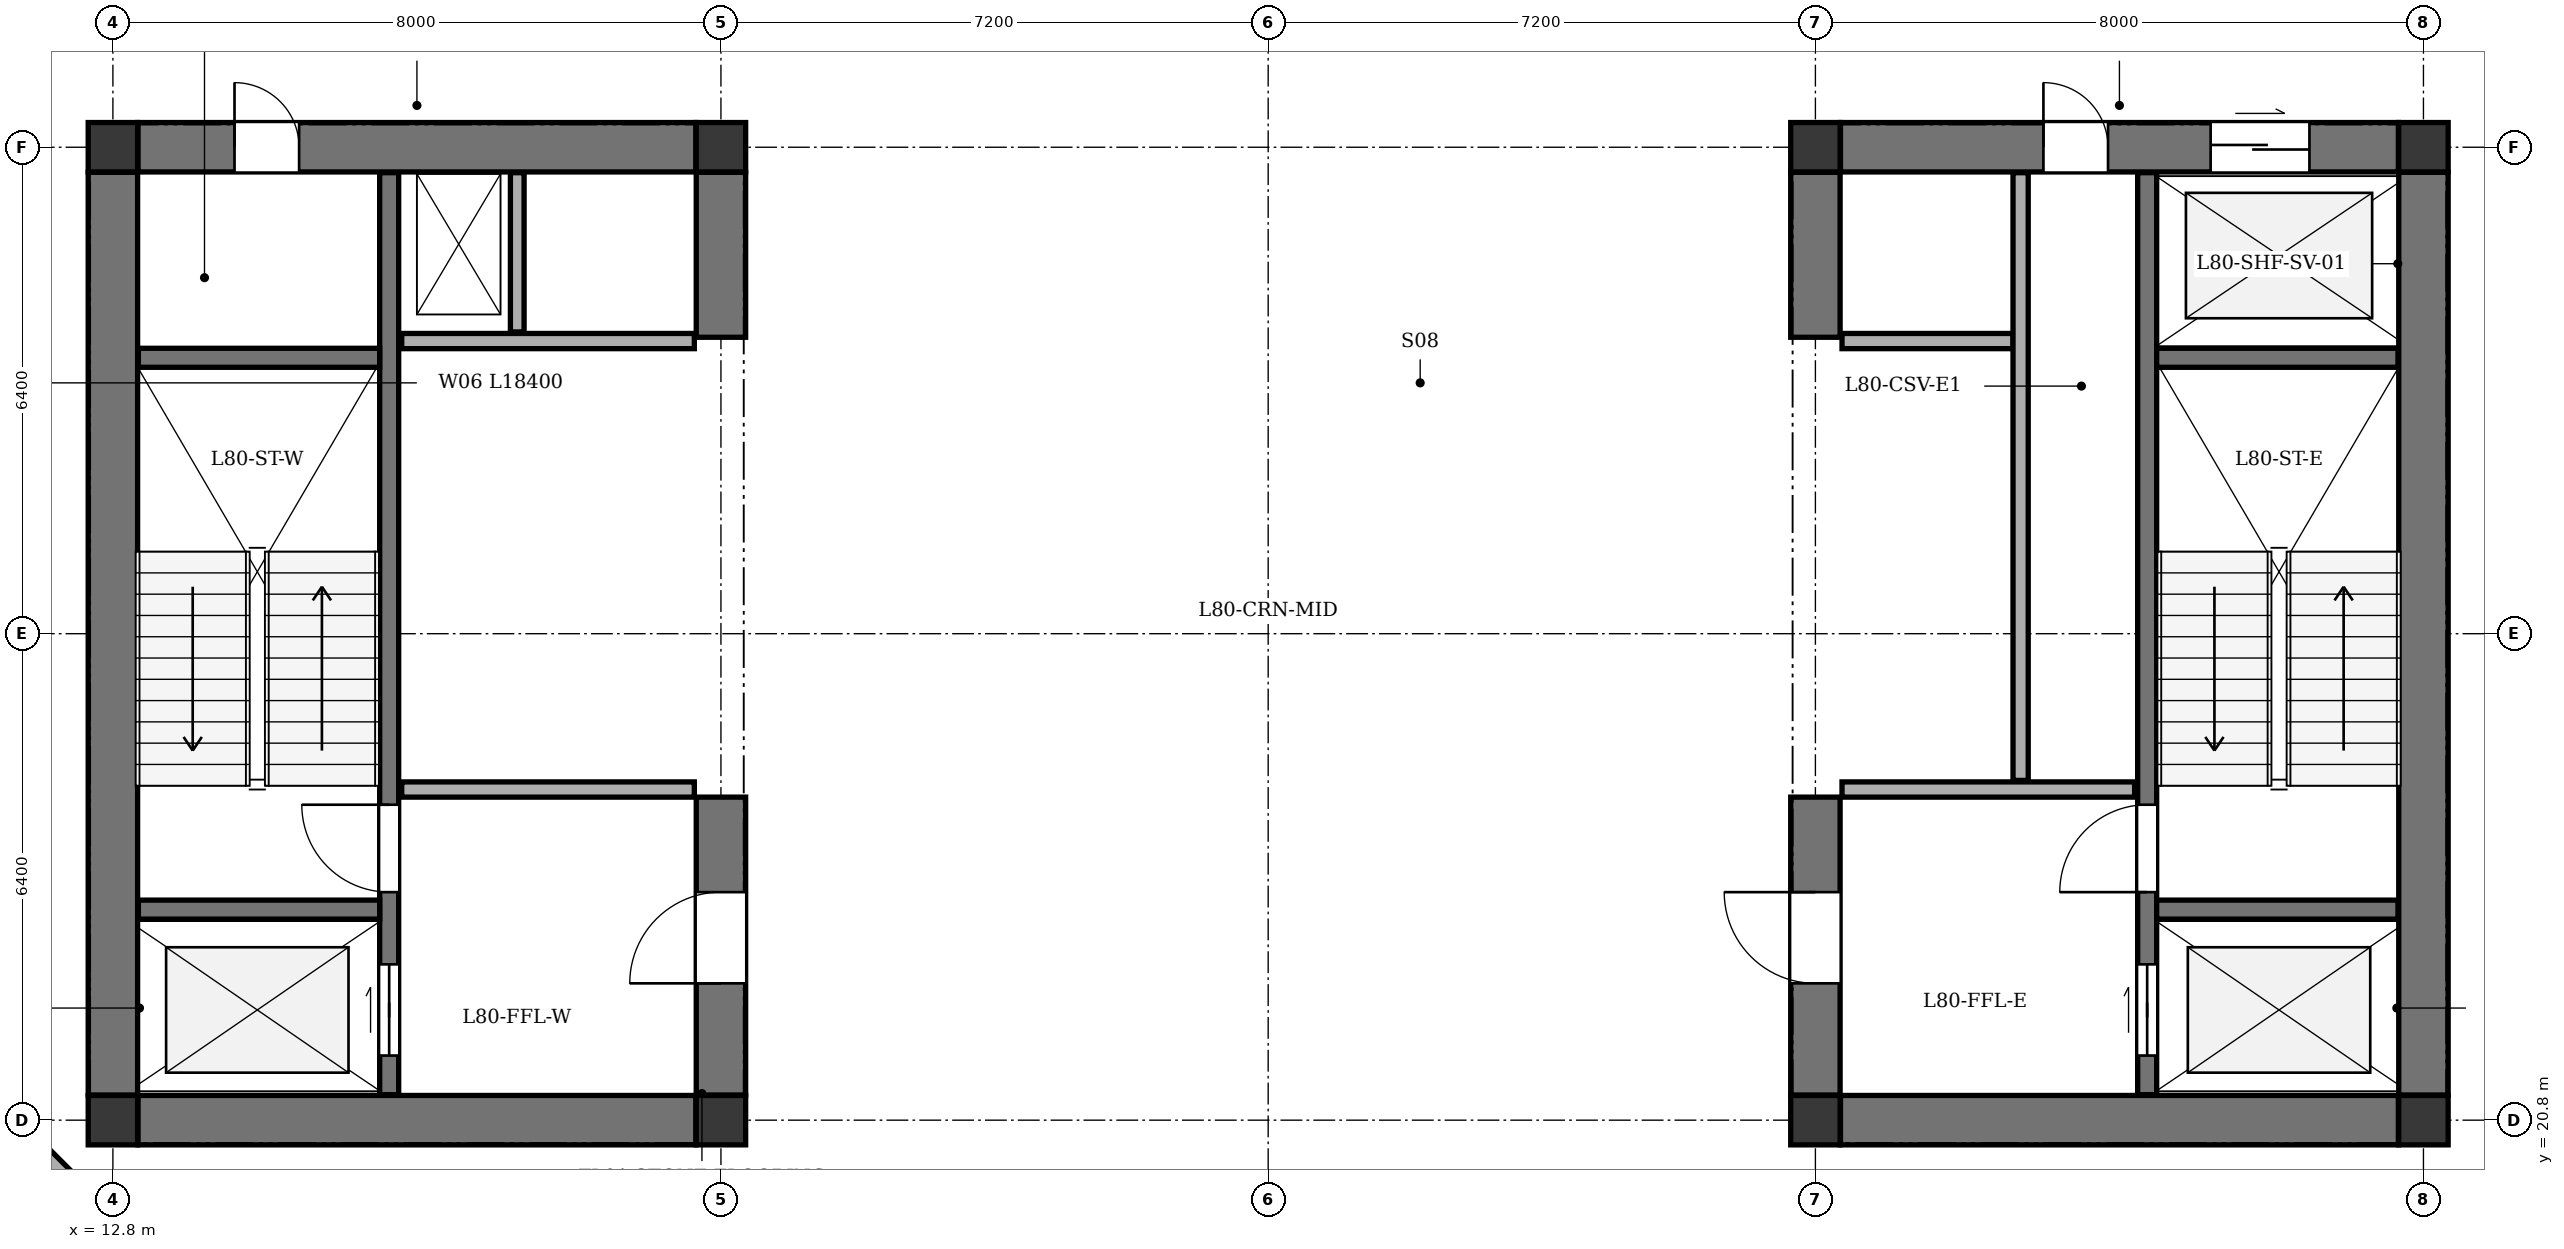
"""IFC4 building model, lengths in metres.
Left out: names, types, materials, properties, quantities, classifications, styles, units other than length and angle.
Written with IfcOpenShell. Run it as: python <this file> out.ifc"""

import sys

from ifc_helpers import new_model, si_unit, direction, frame, frame_2d, origin, origin_2d, place, context, subcontext, project, spatial, rectangle, extrude, element, fill, save


model = new_model("IFC4")
c1 = context("Model", 3, precision=1e-05, world=origin(), true_north=direction((0.0, 1.0)))
c2 = subcontext(c1, "Body", "Model", "MODEL_VIEW")
j1 = project(units=[si_unit("LENGTHUNIT", "METRE"), si_unit("PLANEANGLEUNIT", "RADIAN")], contexts=[c1])
p1 = place(None, origin())
s1 = spatial("IfcSite", under=j1, at=p1, CompositionType="ELEMENT")
p2 = place(p1, origin())
s2 = spatial("IfcBuilding", under=s1, at=p2, CompositionType="ELEMENT")
p3 = place(p2, frame((0.0, 0.0, 304.8)))
s3 = spatial("IfcBuildingStorey", under=s2, at=p3, CompositionType="ELEMENT", Elevation=304.8)
for number, where, z_axis, x_axis in (
    (1, (12.8, 20.8, 0.0), (0.0, 0.0, 1.0), (1.0, 0.0, 0.0)),
    (2, (20.8, 20.8, 0.0), (0.0, 0.0, 1.0), (1.0, 0.0, 0.0)),
    (3, (12.8, 33.6, 0.0), (0.0, 0.0, 1.0), (1.0, 0.0, 0.0)),
    (4, (20.8, 33.6, 0.0), (0.0, 0.0, 1.0), (1.0, 0.0, 0.0)),
    (5, (35.2, 20.8, 0.0), (0.0, 0.0, 1.0), (1.0, 0.0, 0.0)),
    (6, (43.2, 20.8, 0.0), (0.0, 0.0, 1.0), (1.0, 0.0, 0.0)),
    (7, (35.2, 33.6, 0.0), (0.0, 0.0, 1.0), (1.0, 0.0, 0.0)),
    (8, (43.2, 33.6, 0.0), (0.0, 0.0, 1.0), (1.0, 0.0, 0.0)),
):
    element("IfcColumn", number, at=place(p3, frame(where, z_axis=z_axis, x_axis=x_axis)), inside=s3, PredefinedType="COLUMN", context=c2, shape_type="SweptSolid", body=[
        extrude(rectangle(XDim=0.65, YDim=0.65, at=origin_2d()), origin(), (0.0, 0.0, 1.0), 4.2),
    ])
p4 = place(p3, frame((14.2, 17.97, 0.0), z_axis=(0.0, 0.0, 1.0), x_axis=(-0.707080859425, 0.707132701998, 0.0)))
e9 = element("IfcWall", 9, at=p4, inside=s3, PredefinedType="STANDARD", context=c2, shape_type="SweptSolid", body=[
    extrude(rectangle(XDim=4.709, YDim=0.3, at=frame_2d((2.354, 0.0))), origin(), (0.0, 0.0, 1.0), 3.545),
])
p5 = place(p3, frame((12.8, 21.13, 0.0), z_axis=(0.0, 0.0, 1.0), x_axis=(0.0, 1.0, 0.0)))
e10 = element("IfcWall", 10, at=p5, inside=s3, PredefinedType="SHEAR", context=c2, shape_type="SweptSolid", body=[
    extrude(rectangle(XDim=12.14, YDim=0.65, at=frame_2d((6.07, 0.0))), origin(), (0.0, 0.0, 1.0), 3.92),
])
p6 = place(p3, frame((13.13, 20.8, 0.0), z_axis=(0.0, 0.0, 1.0), x_axis=(1.0, 0.0, 0.0)))
e11 = element("IfcWall", 11, at=p6, inside=s3, PredefinedType="SHEAR", context=c2, shape_type="SweptSolid", body=[
    extrude(rectangle(XDim=7.34, YDim=0.65, at=frame_2d((3.67, 0.0))), origin(), (0.0, 0.0, 1.0), 3.92),
])
p7 = place(p3, frame((13.13, 33.6, 0.0), z_axis=(0.0, 0.0, 1.0), x_axis=(1.0, 0.0, 0.0)))
e12 = element("IfcWall", 12, at=p7, inside=s3, PredefinedType="SHEAR", context=c2, shape_type="SweptSolid", body=[
    extrude(rectangle(XDim=7.34, YDim=0.65, at=frame_2d((3.67, 0.0))), origin(), (0.0, 0.0, 1.0), 3.92),
])
p8 = place(p7, frame((1.27, 0.0, 0.0)))
e13 = element("IfcOpeningElement", 13, at=p8, cuts=e12, PredefinedType="OPENING", context=c2, shape_type="SweptSolid", body=[
    extrude(rectangle(XDim=0.85, YDim=2.02, at=frame_2d((0.425, 1.01))), frame((0.0, 0.335, 0.0), z_axis=(0.0, -1.0, 0.0), x_axis=(1.0, 0.0, 0.0)), (0.0, 0.0, 1.0), 0.67),
])
p9 = place(p3, frame((20.8, 21.13, 0.0), z_axis=(0.0, 0.0, 1.0), x_axis=(0.0, 1.0, 0.0)))
e14 = element("IfcWall", 14, at=p9, inside=s3, PredefinedType="SHEAR", context=c2, shape_type="SweptSolid", body=[
    extrude(rectangle(XDim=3.92, YDim=0.65, at=frame_2d((1.96, 0.0))), origin(), (0.0, 0.0, 1.0), 3.92),
])
p10 = place(p9, frame((1.47, 0.0, 0.0)))
e15 = element("IfcOpeningElement", 15, at=p10, cuts=e14, PredefinedType="OPENING", context=c2, shape_type="SweptSolid", body=[
    extrude(rectangle(XDim=1.2, YDim=2.15, at=frame_2d((0.6, 1.075))), frame((0.0, 0.335, 0.0), z_axis=(0.0, -1.0, 0.0), x_axis=(1.0, 0.0, 0.0)), (0.0, 0.0, 1.0), 0.67),
])
p11 = place(p3, frame((20.8, 31.1, 0.0), z_axis=(0.0, 0.0, 1.0), x_axis=(0.0, 1.0, 0.0)))
e16 = element("IfcWall", 16, at=p11, inside=s3, PredefinedType="SHEAR", context=c2, shape_type="SweptSolid", body=[
    extrude(rectangle(XDim=2.17, YDim=0.65, at=frame_2d((1.085, 0.0))), origin(), (0.0, 0.0, 1.0), 3.92),
])
p12 = place(p3, frame((16.435, 21.135, 0.0), z_axis=(0.0, 0.0, 1.0), x_axis=(0.0, 1.0, 0.0)))
e17 = element("IfcWall", 17, at=p12, inside=s3, PredefinedType="SHEAR", context=c2, shape_type="SweptSolid", body=[
    extrude(rectangle(XDim=12.13, YDim=0.25, at=frame_2d((6.065, 0.0))), origin(), (0.0, 0.0, 1.0), 3.92),
])
p13 = place(p12, frame((0.515, 0.0, 0.0)))
e18 = element("IfcOpeningElement", 18, at=p13, cuts=e17, PredefinedType="OPENING", context=c2, shape_type="SweptSolid", body=[
    extrude(rectangle(XDim=1.2, YDim=2.15, at=frame_2d((0.6, 1.075))), frame((0.0, 0.135, 0.0), z_axis=(0.0, -1.0, 0.0), x_axis=(1.0, 0.0, 0.0)), (0.0, 0.0, 1.0), 0.27),
])
p14 = place(p12, frame((2.665, 0.0, 0.0)))
e19 = element("IfcOpeningElement", 19, at=p14, cuts=e17, PredefinedType="OPENING", context=c2, shape_type="SweptSolid", body=[
    extrude(rectangle(XDim=1.15, YDim=2.15, at=frame_2d((0.575, 1.075))), frame((0.0, 0.135, 0.0), z_axis=(0.0, -1.0, 0.0), x_axis=(1.0, 0.0, 0.0)), (0.0, 0.0, 1.0), 0.27),
])
for number, where, z_axis, x_axis in (
    (20, (13.135, 23.57, 0.0), (0.0, 0.0, 1.0), (1.0, 0.0, 0.0)),
    (21, (13.135, 30.83, 0.0), (0.0, 0.0, 1.0), (1.0, 0.0, 0.0)),
):
    element("IfcWall", number, at=place(p3, frame(where, z_axis=z_axis, x_axis=x_axis)), inside=s3, PredefinedType="SHEAR", context=c2, shape_type="SweptSolid", body=[
        extrude(rectangle(XDim=3.175, YDim=0.25, at=frame_2d((1.587, 0.0))), origin(), (0.0, 0.0, 1.0), 3.92),
    ])
for number, where, z_axis, x_axis in (
    (22, (16.6, 25.15, 0.0), (0.0, 0.0, 1.0), (1.0, 0.0, 0.0)),
    (23, (16.6, 31.05, 0.0), (0.0, 0.0, 1.0), (1.0, 0.0, 0.0)),
):
    element("IfcWall", number, at=place(p3, frame(where, z_axis=z_axis, x_axis=x_axis)), inside=s3, PredefinedType="SOLIDWALL", context=c2, shape_type="SweptSolid", body=[
        extrude(rectangle(XDim=3.85, YDim=0.2, at=frame_2d((1.925, 0.0))), origin(), (0.0, 0.0, 1.0), 3.92),
    ])
p15 = place(p3, frame((18.12, 31.17, 0.0), z_axis=(0.0, 0.0, 1.0), x_axis=(0.0, 1.0, 0.0)))
e24 = element("IfcWall", 24, at=p15, inside=s3, PredefinedType="PARTITIONING", context=c2, shape_type="SweptSolid", body=[
    extrude(rectangle(XDim=2.095, YDim=0.18, at=frame_2d((1.047, 0.0))), origin(), (0.0, 0.0, 1.0), 3.92),
])
p16 = place(p3, frame((43.2, 21.13, 0.0), z_axis=(0.0, 0.0, 1.0), x_axis=(0.0, 1.0, 0.0)))
e25 = element("IfcWall", 25, at=p16, inside=s3, PredefinedType="SHEAR", context=c2, shape_type="SweptSolid", body=[
    extrude(rectangle(XDim=12.14, YDim=0.65, at=frame_2d((6.07, 0.0))), origin(), (0.0, 0.0, 1.0), 3.92),
])
p17 = place(p3, frame((35.53, 20.8, 0.0), z_axis=(0.0, 0.0, 1.0), x_axis=(1.0, 0.0, 0.0)))
e26 = element("IfcWall", 26, at=p17, inside=s3, PredefinedType="SHEAR", context=c2, shape_type="SweptSolid", body=[
    extrude(rectangle(XDim=7.34, YDim=0.65, at=frame_2d((3.67, 0.0))), origin(), (0.0, 0.0, 1.0), 3.92),
])
p18 = place(p3, frame((35.53, 33.6, 0.0), z_axis=(0.0, 0.0, 1.0), x_axis=(1.0, 0.0, 0.0)))
e27 = element("IfcWall", 27, at=p18, inside=s3, PredefinedType="SHEAR", context=c2, shape_type="SweptSolid", body=[
    extrude(rectangle(XDim=7.34, YDim=0.65, at=frame_2d((3.67, 0.0))), origin(), (0.0, 0.0, 1.0), 3.92),
])
p19 = place(p18, frame((4.87, 0.0, 0.0)))
e28 = element("IfcOpeningElement", 28, at=p19, cuts=e27, PredefinedType="OPENING", context=c2, shape_type="SweptSolid", body=[
    extrude(rectangle(XDim=1.3, YDim=2.15, at=frame_2d((0.65, 1.075))), frame((0.0, 0.335, 0.0), z_axis=(0.0, -1.0, 0.0), x_axis=(1.0, 0.0, 0.0)), (0.0, 0.0, 1.0), 0.67),
])
p20 = place(p18, frame((2.67, 0.0, 0.0)))
e29 = element("IfcOpeningElement", 29, at=p20, cuts=e27, PredefinedType="OPENING", context=c2, shape_type="SweptSolid", body=[
    extrude(rectangle(XDim=0.85, YDim=2.02, at=frame_2d((0.425, 1.01))), frame((0.0, 0.335, 0.0), z_axis=(0.0, -1.0, 0.0), x_axis=(1.0, 0.0, 0.0)), (0.0, 0.0, 1.0), 0.67),
])
p21 = place(p3, frame((35.2, 21.13, 0.0), z_axis=(0.0, 0.0, 1.0), x_axis=(0.0, 1.0, 0.0)))
e30 = element("IfcWall", 30, at=p21, inside=s3, PredefinedType="SHEAR", context=c2, shape_type="SweptSolid", body=[
    extrude(rectangle(XDim=3.92, YDim=0.65, at=frame_2d((1.96, 0.0))), origin(), (0.0, 0.0, 1.0), 3.92),
])
p22 = place(p21, frame((1.47, 0.0, 0.0)))
e31 = element("IfcOpeningElement", 31, at=p22, cuts=e30, PredefinedType="OPENING", context=c2, shape_type="SweptSolid", body=[
    extrude(rectangle(XDim=1.2, YDim=2.15, at=frame_2d((0.6, 1.075))), frame((0.0, 0.335, 0.0), z_axis=(0.0, -1.0, 0.0), x_axis=(1.0, 0.0, 0.0)), (0.0, 0.0, 1.0), 0.67),
])
p23 = place(p3, frame((35.2, 31.1, 0.0), z_axis=(0.0, 0.0, 1.0), x_axis=(0.0, 1.0, 0.0)))
e32 = element("IfcWall", 32, at=p23, inside=s3, PredefinedType="SHEAR", context=c2, shape_type="SweptSolid", body=[
    extrude(rectangle(XDim=2.17, YDim=0.65, at=frame_2d((1.085, 0.0))), origin(), (0.0, 0.0, 1.0), 3.92),
])
p24 = place(p3, frame((39.565, 21.135, 0.0), z_axis=(0.0, 0.0, 1.0), x_axis=(0.0, 1.0, 0.0)))
e33 = element("IfcWall", 33, at=p24, inside=s3, PredefinedType="SHEAR", context=c2, shape_type="SweptSolid", body=[
    extrude(rectangle(XDim=12.13, YDim=0.25, at=frame_2d((6.065, 0.0))), origin(), (0.0, 0.0, 1.0), 3.92),
])
p25 = place(p24, frame((0.515, 0.0, 0.0)))
e34 = element("IfcOpeningElement", 34, at=p25, cuts=e33, PredefinedType="OPENING", context=c2, shape_type="SweptSolid", body=[
    extrude(rectangle(XDim=1.2, YDim=2.15, at=frame_2d((0.6, 1.075))), frame((0.0, 0.135, 0.0), z_axis=(0.0, -1.0, 0.0), x_axis=(1.0, 0.0, 0.0)), (0.0, 0.0, 1.0), 0.27),
])
p26 = place(p24, frame((2.665, 0.0, 0.0)))
e35 = element("IfcOpeningElement", 35, at=p26, cuts=e33, PredefinedType="OPENING", context=c2, shape_type="SweptSolid", body=[
    extrude(rectangle(XDim=1.15, YDim=2.15, at=frame_2d((0.575, 1.075))), frame((0.0, 0.135, 0.0), z_axis=(0.0, -1.0, 0.0), x_axis=(1.0, 0.0, 0.0)), (0.0, 0.0, 1.0), 0.27),
])
for number, where, z_axis, x_axis in (
    (36, (39.69, 23.57, 0.0), (0.0, 0.0, 1.0), (1.0, 0.0, 0.0)),
    (37, (39.69, 30.83, 0.0), (0.0, 0.0, 1.0), (1.0, 0.0, 0.0)),
):
    element("IfcWall", number, at=place(p3, frame(where, z_axis=z_axis, x_axis=x_axis)), inside=s3, PredefinedType="SHEAR", context=c2, shape_type="SweptSolid", body=[
        extrude(rectangle(XDim=3.175, YDim=0.25, at=frame_2d((1.587, 0.0))), origin(), (0.0, 0.0, 1.0), 3.92),
    ])
p27 = place(p3, frame((35.55, 25.15, 0.0), z_axis=(0.0, 0.0, 1.0), x_axis=(1.0, 0.0, 0.0)))
e38 = element("IfcWall", 38, at=p27, inside=s3, PredefinedType="SOLIDWALL", context=c2, shape_type="SweptSolid", body=[
    extrude(rectangle(XDim=3.85, YDim=0.2, at=frame_2d((1.925, 0.0))), origin(), (0.0, 0.0, 1.0), 3.92),
])
p28 = place(p3, frame((35.55, 31.05, 0.0), z_axis=(0.0, 0.0, 1.0), x_axis=(1.0, 0.0, 0.0)))
e39 = element("IfcWall", 39, at=p28, inside=s3, PredefinedType="SOLIDWALL", context=c2, shape_type="SweptSolid", body=[
    extrude(rectangle(XDim=2.25, YDim=0.2, at=frame_2d((1.125, 0.0))), origin(), (0.0, 0.0, 1.0), 3.92),
])
p29 = place(p3, frame((37.9, 25.27, 0.0), z_axis=(0.0, 0.0, 1.0), x_axis=(0.0, 1.0, 0.0)))
e40 = element("IfcWall", 40, at=p29, inside=s3, PredefinedType="SOLIDWALL", context=c2, shape_type="SweptSolid", body=[
    extrude(rectangle(XDim=7.995, YDim=0.2, at=frame_2d((3.998, 0.0))), origin(), (0.0, 0.0, 1.0), 3.92),
])
p30 = place(p8, origin())
e41 = element("IfcDoor", 41, at=p30, inside=s3, OperationType="SINGLE_SWING_LEFT", PredefinedType="DOOR", context=c2, shape_type="SweptSolid", body=[
    extrude(rectangle(XDim=0.85, YDim=2.02, at=frame_2d((0.425, 1.01))), frame((0.0, 0.025, 0.0), z_axis=(0.0, -1.0, 0.0), x_axis=(1.0, 0.0, 0.0)), (0.0, 0.0, 1.0), 0.05),
])
fill(e13, e41)
p31 = place(p10, origin())
e42 = element("IfcDoor", 42, at=p31, inside=s3, OperationType="SINGLE_SWING_LEFT", PredefinedType="DOOR", context=c2, shape_type="SweptSolid", body=[
    extrude(rectangle(XDim=1.2, YDim=2.15, at=frame_2d((0.6, 1.075))), frame((0.0, 0.025, 0.0), z_axis=(0.0, -1.0, 0.0), x_axis=(1.0, 0.0, 0.0)), (0.0, 0.0, 1.0), 0.05),
])
fill(e15, e42)
p32 = place(p13, origin())
e43 = element("IfcDoor", 43, at=p32, inside=s3, OperationType="DOUBLE_DOOR_SLIDING", PredefinedType="DOOR", context=c2, shape_type="SweptSolid", body=[
    extrude(rectangle(XDim=1.2, YDim=2.15, at=frame_2d((0.6, 1.075))), frame((0.0, 0.025, 0.0), z_axis=(0.0, -1.0, 0.0), x_axis=(1.0, 0.0, 0.0)), (0.0, 0.0, 1.0), 0.05),
])
fill(e18, e43)
p33 = place(p14, origin())
e44 = element("IfcDoor", 44, at=p33, inside=s3, OperationType="SINGLE_SWING_RIGHT", PredefinedType="DOOR", context=c2, shape_type="SweptSolid", body=[
    extrude(rectangle(XDim=1.15, YDim=2.15, at=frame_2d((0.575, 1.075))), frame((0.0, 0.025, 0.0), z_axis=(0.0, -1.0, 0.0), x_axis=(1.0, 0.0, 0.0)), (0.0, 0.0, 1.0), 0.05),
])
fill(e19, e44)
p34 = place(p19, origin())
e45 = element("IfcDoor", 45, at=p34, inside=s3, OperationType="DOUBLE_DOOR_SLIDING", PredefinedType="DOOR", context=c2, shape_type="SweptSolid", body=[
    extrude(rectangle(XDim=1.3, YDim=2.15, at=frame_2d((0.65, 1.075))), frame((0.0, 0.025, 0.0), z_axis=(0.0, -1.0, 0.0), x_axis=(1.0, 0.0, 0.0)), (0.0, 0.0, 1.0), 0.05),
])
fill(e28, e45)
p35 = place(p20, origin())
e46 = element("IfcDoor", 46, at=p35, inside=s3, OperationType="SINGLE_SWING_LEFT", PredefinedType="DOOR", context=c2, shape_type="SweptSolid", body=[
    extrude(rectangle(XDim=0.85, YDim=2.02, at=frame_2d((0.425, 1.01))), frame((0.0, 0.025, 0.0), z_axis=(0.0, -1.0, 0.0), x_axis=(1.0, 0.0, 0.0)), (0.0, 0.0, 1.0), 0.05),
])
fill(e29, e46)
p36 = place(p22, origin())
e47 = element("IfcDoor", 47, at=p36, inside=s3, OperationType="SINGLE_SWING_RIGHT", PredefinedType="DOOR", context=c2, shape_type="SweptSolid", body=[
    extrude(rectangle(XDim=1.2, YDim=2.15, at=frame_2d((0.6, 1.075))), frame((0.0, 0.025, 0.0), z_axis=(0.0, -1.0, 0.0), x_axis=(1.0, 0.0, 0.0)), (0.0, 0.0, 1.0), 0.05),
])
fill(e31, e47)
p37 = place(p25, origin())
e48 = element("IfcDoor", 48, at=p37, inside=s3, OperationType="DOUBLE_DOOR_SLIDING", PredefinedType="DOOR", context=c2, shape_type="SweptSolid", body=[
    extrude(rectangle(XDim=1.2, YDim=2.15, at=frame_2d((0.6, 1.075))), frame((0.0, 0.025, 0.0), z_axis=(0.0, -1.0, 0.0), x_axis=(1.0, 0.0, 0.0)), (0.0, 0.0, 1.0), 0.05),
])
fill(e34, e48)
p38 = place(p26, origin())
e49 = element("IfcDoor", 49, at=p38, inside=s3, OperationType="SINGLE_SWING_LEFT", PredefinedType="DOOR", context=c2, shape_type="SweptSolid", body=[
    extrude(rectangle(XDim=1.15, YDim=2.15, at=frame_2d((0.575, 1.075))), frame((0.0, 0.025, 0.0), z_axis=(0.0, -1.0, 0.0), x_axis=(1.0, 0.0, 0.0)), (0.0, 0.0, 1.0), 0.05),
])
fill(e35, e49)
save(model, sys.argv[1])
